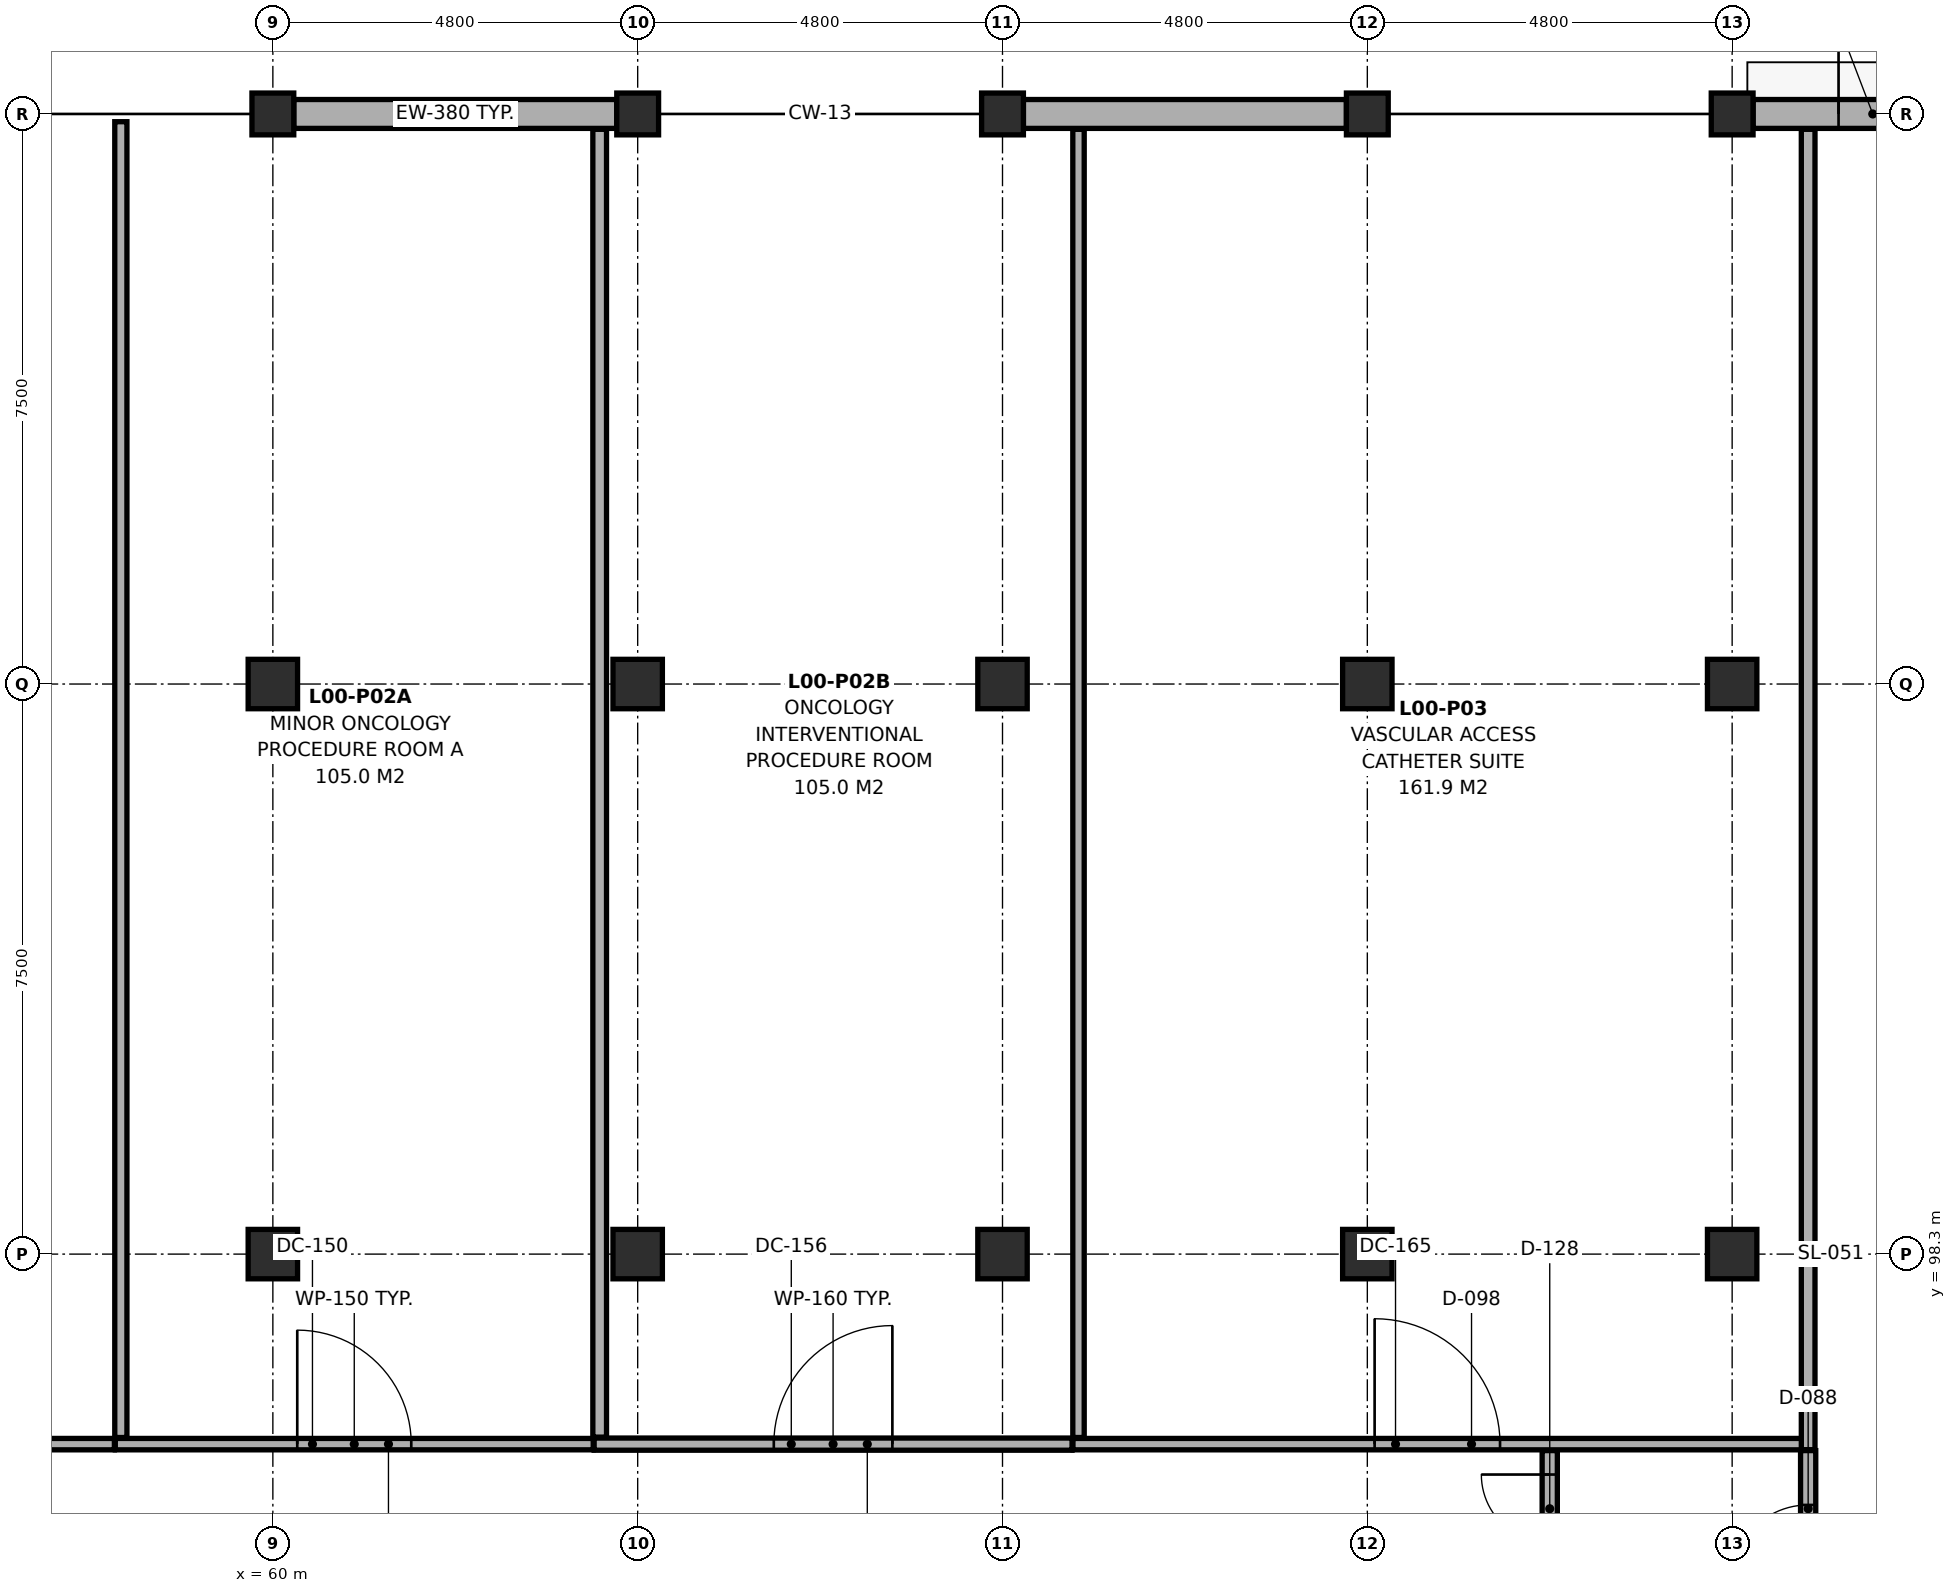
"""IFC4 building model, lengths in metres.
Left out: names, types, materials, properties, quantities, classifications, styles, units other than length and angle.
Written with IfcOpenShell. Run it as: python <this file> out.ifc"""

import sys

from ifc_helpers import new_model, si_unit, direction, frame, frame_2d, origin, origin_2d, place, context, subcontext, project, spatial, rectangle, extrude, element, fill, save


model = new_model("IFC4")
c1 = context("Model", 3, precision=1e-05, world=origin(), true_north=direction((0.0, 1.0)))
c2 = subcontext(c1, "Body", "Model", "MODEL_VIEW")
j1 = project(units=[si_unit("LENGTHUNIT", "METRE"), si_unit("PLANEANGLEUNIT", "RADIAN")], contexts=[c1])
p1 = place(None, origin())
s1 = spatial("IfcSite", under=j1, at=p1, CompositionType="ELEMENT")
p2 = place(p1, origin())
s2 = spatial("IfcBuilding", under=s1, at=p2, CompositionType="ELEMENT")
p3 = place(p2, origin())
s3 = spatial("IfcBuildingStorey", under=s2, at=p3, CompositionType="ELEMENT", Elevation=0.0)
for number, where, z_axis, x_axis in (
    (1, (60.0, 98.3, 0.0), (0.0, 0.0, 1.0), (1.0, 0.0, 0.0)),
    (2, (60.0, 105.8, 0.0), (0.0, 0.0, 1.0), (1.0, 0.0, 0.0)),
):
    element("IfcColumn", number, at=place(p3, frame(where, z_axis=z_axis, x_axis=x_axis)), inside=s3, PredefinedType="COLUMN", context=c2, shape_type="SweptSolid", body=[
        extrude(rectangle(XDim=0.65, YDim=0.65, at=origin_2d()), origin(), (0.0, 0.0, 1.0), 4.7),
    ])
p4 = place(p3, frame((60.0, 113.3, 0.0), z_axis=(0.0, 0.0, 1.0), x_axis=(1.0, 0.0, 0.0)))
e3 = element("IfcColumn", 3, at=p4, inside=s3, PredefinedType="COLUMN", context=c2, shape_type="SweptSolid", body=[
    extrude(rectangle(XDim=0.55, YDim=0.55, at=origin_2d()), origin(), (0.0, 0.0, 1.0), 4.7),
])
for number, where, z_axis, x_axis in (
    (4, (64.8, 98.3, 0.0), (0.0, 0.0, 1.0), (1.0, 0.0, 0.0)),
    (5, (64.8, 105.8, 0.0), (0.0, 0.0, 1.0), (1.0, 0.0, 0.0)),
):
    element("IfcColumn", number, at=place(p3, frame(where, z_axis=z_axis, x_axis=x_axis)), inside=s3, PredefinedType="COLUMN", context=c2, shape_type="SweptSolid", body=[
        extrude(rectangle(XDim=0.65, YDim=0.65, at=origin_2d()), origin(), (0.0, 0.0, 1.0), 4.7),
    ])
p5 = place(p3, frame((64.8, 113.3, 0.0), z_axis=(0.0, 0.0, 1.0), x_axis=(1.0, 0.0, 0.0)))
e6 = element("IfcColumn", 6, at=p5, inside=s3, PredefinedType="COLUMN", context=c2, shape_type="SweptSolid", body=[
    extrude(rectangle(XDim=0.55, YDim=0.55, at=origin_2d()), origin(), (0.0, 0.0, 1.0), 4.7),
])
for number, where, z_axis, x_axis in (
    (7, (69.6, 98.3, 0.0), (0.0, 0.0, 1.0), (1.0, 0.0, 0.0)),
    (8, (69.6, 105.8, 0.0), (0.0, 0.0, 1.0), (1.0, 0.0, 0.0)),
):
    element("IfcColumn", number, at=place(p3, frame(where, z_axis=z_axis, x_axis=x_axis)), inside=s3, PredefinedType="COLUMN", context=c2, shape_type="SweptSolid", body=[
        extrude(rectangle(XDim=0.65, YDim=0.65, at=origin_2d()), origin(), (0.0, 0.0, 1.0), 4.7),
    ])
p6 = place(p3, frame((69.6, 113.3, 0.0), z_axis=(0.0, 0.0, 1.0), x_axis=(1.0, 0.0, 0.0)))
e9 = element("IfcColumn", 9, at=p6, inside=s3, PredefinedType="COLUMN", context=c2, shape_type="SweptSolid", body=[
    extrude(rectangle(XDim=0.55, YDim=0.55, at=origin_2d()), origin(), (0.0, 0.0, 1.0), 4.7),
])
for number, where, z_axis, x_axis in (
    (10, (74.4, 98.3, 0.0), (0.0, 0.0, 1.0), (1.0, 0.0, 0.0)),
    (11, (74.4, 105.8, 0.0), (0.0, 0.0, 1.0), (1.0, 0.0, 0.0)),
):
    element("IfcColumn", number, at=place(p3, frame(where, z_axis=z_axis, x_axis=x_axis)), inside=s3, PredefinedType="COLUMN", context=c2, shape_type="SweptSolid", body=[
        extrude(rectangle(XDim=0.65, YDim=0.65, at=origin_2d()), origin(), (0.0, 0.0, 1.0), 4.7),
    ])
p7 = place(p3, frame((74.4, 113.3, 0.0), z_axis=(0.0, 0.0, 1.0), x_axis=(1.0, 0.0, 0.0)))
e12 = element("IfcColumn", 12, at=p7, inside=s3, PredefinedType="COLUMN", context=c2, shape_type="SweptSolid", body=[
    extrude(rectangle(XDim=0.55, YDim=0.55, at=origin_2d()), origin(), (0.0, 0.0, 1.0), 4.7),
])
for number, where, z_axis, x_axis in (
    (13, (79.2, 98.3, 0.0), (0.0, 0.0, 1.0), (1.0, 0.0, 0.0)),
    (14, (79.2, 105.8, 0.0), (0.0, 0.0, 1.0), (1.0, 0.0, 0.0)),
):
    element("IfcColumn", number, at=place(p3, frame(where, z_axis=z_axis, x_axis=x_axis)), inside=s3, PredefinedType="COLUMN", context=c2, shape_type="SweptSolid", body=[
        extrude(rectangle(XDim=0.65, YDim=0.65, at=origin_2d()), origin(), (0.0, 0.0, 1.0), 4.7),
    ])
p8 = place(p3, frame((79.2, 113.3, 0.0), z_axis=(0.0, 0.0, 1.0), x_axis=(1.0, 0.0, 0.0)))
e15 = element("IfcColumn", 15, at=p8, inside=s3, PredefinedType="COLUMN", context=c2, shape_type="SweptSolid", body=[
    extrude(rectangle(XDim=0.55, YDim=0.55, at=origin_2d()), origin(), (0.0, 0.0, 1.0), 4.7),
])
for number, where, z_axis, x_axis in (
    (16, (60.275, 113.3, 0.0), (0.0, 0.0, 1.0), (1.0, 0.0, 0.0)),
    (17, (69.875, 113.3, 0.0), (0.0, 0.0, 1.0), (1.0, 0.0, 0.0)),
):
    element("IfcWall", number, at=place(p3, frame(where, z_axis=z_axis, x_axis=x_axis)), inside=s3, PredefinedType="SOLIDWALL", context=c2, shape_type="SweptSolid", body=[
        extrude(rectangle(XDim=4.25, YDim=0.38, at=frame_2d((2.125, 0.0))), origin(), (0.0, 0.0, 1.0), 3.985),
    ])
p9 = place(p3, frame((79.475, 113.3, 0.0), z_axis=(0.0, 0.0, 1.0), x_axis=(1.0, 0.0, 0.0)))
e18 = element("IfcWall", 18, at=p9, inside=s3, PredefinedType="SOLIDWALL", context=c2, shape_type="SweptSolid", body=[
    extrude(rectangle(XDim=4.25, YDim=0.38, at=frame_2d((2.125, 0.0))), origin(), (0.0, 0.0, 1.0), 3.985),
])
p10 = place(p9, frame((1.125, 0.0, 0.0)))
e19 = element("IfcOpeningElement", 19, at=p10, cuts=e18, PredefinedType="OPENING", context=c2, shape_type="SweptSolid", body=[
    extrude(rectangle(XDim=2.0, YDim=2.35, at=frame_2d((1.0, 1.175))), frame((0.0, 0.202, 0.0), z_axis=(0.0, -1.0, 0.0), x_axis=(1.0, 0.0, 0.0)), (0.0, 0.0, 1.0), 0.404),
])
p11 = place(p3, frame((76.8, 93.285, 0.0), z_axis=(0.0, 0.0, 1.0), x_axis=(0.0, 1.0, 0.0)))
e20 = element("IfcWall", 20, at=p11, inside=s3, PredefinedType="PARTITIONING", context=c2, shape_type="SweptSolid", body=[
    extrude(rectangle(XDim=2.43, YDim=0.2, at=frame_2d((1.215, 0.0))), origin(), (0.0, 0.0, 1.0), 4.7),
])
p12 = place(p11, frame((0.315, 0.0, 0.0)))
e21 = element("IfcOpeningElement", 21, at=p12, cuts=e20, PredefinedType="OPENING", context=c2, shape_type="SweptSolid", body=[
    extrude(rectangle(XDim=1.8, YDim=2.15, at=frame_2d((0.9, 1.075))), frame((0.0, 0.112, 0.0), z_axis=(0.0, -1.0, 0.0), x_axis=(1.0, 0.0, 0.0)), (0.0, 0.0, 1.0), 0.224),
])
p13 = place(p3, frame((45.127, 95.8, 0.0), z_axis=(0.0, 0.0, 1.0), x_axis=(1.0, 0.0, 0.0)))
e22 = element("IfcWall", 22, at=p13, inside=s3, PredefinedType="PARTITIONING", context=c2, shape_type="SweptSolid", body=[
    extrude(rectangle(XDim=12.788, YDim=0.15, at=frame_2d((6.394, 0.0))), origin(), (0.0, 0.0, 1.0), 3.985),
])
p14 = place(p13, frame((5.669, 0.0, 0.0)))
e23 = element("IfcOpeningElement", 23, at=p14, cuts=e22, PredefinedType="OPENING", context=c2, shape_type="SweptSolid", body=[
    extrude(rectangle(XDim=1.45, YDim=2.26, at=frame_2d((0.725, 1.13))), frame((0.0, 0.087, 0.0), z_axis=(0.0, -1.0, 0.0), x_axis=(1.0, 0.0, 0.0)), (0.0, 0.0, 1.0), 0.174),
])
p15 = place(p3, frame((57.927, 95.8, 0.0), z_axis=(0.0, 0.0, 1.0), x_axis=(1.0, 0.0, 0.0)))
e24 = element("IfcWall", 24, at=p15, inside=s3, PredefinedType="PARTITIONING", context=c2, shape_type="SweptSolid", body=[
    extrude(rectangle(XDim=6.288, YDim=0.15, at=frame_2d((3.144, 0.0))), origin(), (0.0, 0.0, 1.0), 3.985),
])
p16 = place(p15, frame((2.394, 0.0, 0.0)))
e25 = element("IfcOpeningElement", 25, at=p16, cuts=e24, PredefinedType="OPENING", context=c2, shape_type="SweptSolid", body=[
    extrude(rectangle(XDim=1.5, YDim=2.28, at=frame_2d((0.75, 1.14))), frame((0.0, 0.087, 0.0), z_axis=(0.0, -1.0, 0.0), x_axis=(1.0, 0.0, 0.0)), (0.0, 0.0, 1.0), 0.174),
])
p17 = place(p3, frame((64.227, 95.8, 0.0), z_axis=(0.0, 0.0, 1.0), x_axis=(1.0, 0.0, 0.0)))
e26 = element("IfcWall", 26, at=p17, inside=s3, PredefinedType="PARTITIONING", context=c2, shape_type="SweptSolid", body=[
    extrude(rectangle(XDim=6.288, YDim=0.16, at=frame_2d((3.144, 0.0))), origin(), (0.0, 0.0, 1.0), 3.985),
])
p18 = place(p17, frame((2.364, 0.0, 0.0)))
e27 = element("IfcOpeningElement", 27, at=p18, cuts=e26, PredefinedType="OPENING", context=c2, shape_type="SweptSolid", body=[
    extrude(rectangle(XDim=1.56, YDim=2.3, at=frame_2d((0.78, 1.15))), frame((0.0, 0.092, 0.0), z_axis=(0.0, -1.0, 0.0), x_axis=(1.0, 0.0, 0.0)), (0.0, 0.0, 1.0), 0.184),
])
p19 = place(p3, frame((70.527, 95.8, 0.0), z_axis=(0.0, 0.0, 1.0), x_axis=(1.0, 0.0, 0.0)))
e28 = element("IfcWall", 28, at=p19, inside=s3, PredefinedType="PARTITIONING", context=c2, shape_type="SweptSolid", body=[
    extrude(rectangle(XDim=9.588, YDim=0.15, at=frame_2d((4.794, 0.0))), origin(), (0.0, 0.0, 1.0), 3.985),
])
p20 = place(p19, frame((3.969, 0.0, 0.0)))
e29 = element("IfcOpeningElement", 29, at=p20, cuts=e28, PredefinedType="OPENING", context=c2, shape_type="SweptSolid", body=[
    extrude(rectangle(XDim=1.65, YDim=2.32, at=frame_2d((0.825, 1.16))), frame((0.0, 0.087, 0.0), z_axis=(0.0, -1.0, 0.0), x_axis=(1.0, 0.0, 0.0)), (0.0, 0.0, 1.0), 0.174),
])
p21 = place(p3, frame((80.2, 93.285, 0.0), z_axis=(0.0, 0.0, 1.0), x_axis=(0.0, 1.0, 0.0)))
e30 = element("IfcWall", 30, at=p21, inside=s3, PredefinedType="PARTITIONING", context=c2, shape_type="SweptSolid", body=[
    extrude(rectangle(XDim=2.43, YDim=0.2, at=frame_2d((1.215, 0.0))), origin(), (0.0, 0.0, 1.0), 4.7),
])
p22 = place(p21, frame((0.715, 0.0, 0.0)))
e31 = element("IfcOpeningElement", 31, at=p22, cuts=e30, PredefinedType="OPENING", context=c2, shape_type="SweptSolid", body=[
    extrude(rectangle(XDim=1.0, YDim=2.15, at=frame_2d((0.5, 1.075))), frame((0.0, 0.112, 0.0), z_axis=(0.0, -1.0, 0.0), x_axis=(1.0, 0.0, 0.0)), (0.0, 0.0, 1.0), 0.224),
])
p23 = place(p3, frame((58.0, 95.887, 0.0), z_axis=(0.0, 0.0, 1.0), x_axis=(0.0, 1.0, 0.0)))
e32 = element("IfcWall", 32, at=p23, inside=s3, PredefinedType="PARTITIONING", context=c2, shape_type="SweptSolid", body=[
    extrude(rectangle(XDim=17.311, YDim=0.16, at=frame_2d((8.656, 0.0))), origin(), (0.0, 0.0, 1.0), 3.985),
])
p24 = place(p3, frame((64.3, 95.892, 0.0), z_axis=(0.0, 0.0, 1.0), x_axis=(0.0, 1.0, 0.0)))
e33 = element("IfcWall", 33, at=p24, inside=s3, PredefinedType="PARTITIONING", context=c2, shape_type="SweptSolid", body=[
    extrude(rectangle(XDim=17.206, YDim=0.18, at=frame_2d((8.603, 0.0))), origin(), (0.0, 0.0, 1.0), 4.035),
])
p25 = place(p3, frame((70.6, 95.887, 0.0), z_axis=(0.0, 0.0, 1.0), x_axis=(0.0, 1.0, 0.0)))
e34 = element("IfcWall", 34, at=p25, inside=s3, PredefinedType="PARTITIONING", context=c2, shape_type="SweptSolid", body=[
    extrude(rectangle(XDim=17.211, YDim=0.15, at=frame_2d((8.605, 0.0))), origin(), (0.0, 0.0, 1.0), 4.035),
])
p26 = place(p3, frame((80.2, 95.727, 0.0), z_axis=(0.0, 0.0, 1.0), x_axis=(0.0, 1.0, 0.0)))
e35 = element("IfcWall", 35, at=p26, inside=s3, PredefinedType="PARTITIONING", context=c2, shape_type="SweptSolid", body=[
    extrude(rectangle(XDim=17.371, YDim=0.18, at=frame_2d((8.686, 0.0))), origin(), (0.0, 0.0, 1.0), 4.035),
])
p27 = place(p10, origin())
e36 = element("IfcDoor", 36, at=p27, inside=s3, OperationType="DOUBLE_DOOR_SINGLE_SWING", PredefinedType="DOOR", context=c2, shape_type="SweptSolid", body=[
    extrude(rectangle(XDim=2.0, YDim=2.35, at=frame_2d((1.0, 1.175))), frame((0.0, 0.025, 0.0), z_axis=(0.0, -1.0, 0.0), x_axis=(1.0, 0.0, 0.0)), (0.0, 0.0, 1.0), 0.05),
])
fill(e19, e36)
p28 = place(p12, origin())
e37 = element("IfcDoor", 37, at=p28, inside=s3, OperationType="DOUBLE_DOOR_SINGLE_SWING", PredefinedType="DOOR", context=c2, shape_type="SweptSolid", body=[
    extrude(rectangle(XDim=1.8, YDim=2.15, at=frame_2d((0.9, 1.075))), frame((0.0, 0.025, 0.0), z_axis=(0.0, -1.0, 0.0), x_axis=(1.0, 0.0, 0.0)), (0.0, 0.0, 1.0), 0.05),
])
fill(e21, e37)
p29 = place(p16, origin())
e38 = element("IfcDoor", 38, at=p29, inside=s3, OperationType="SINGLE_SWING_LEFT", PredefinedType="DOOR", context=c2, shape_type="SweptSolid", body=[
    extrude(rectangle(XDim=1.5, YDim=2.28, at=frame_2d((0.75, 1.14))), frame((0.0, 0.025, 0.0), z_axis=(0.0, -1.0, 0.0), x_axis=(1.0, 0.0, 0.0)), (0.0, 0.0, 1.0), 0.05),
])
fill(e25, e38)
p30 = place(p18, origin())
e39 = element("IfcDoor", 39, at=p30, inside=s3, OperationType="SINGLE_SWING_RIGHT", PredefinedType="DOOR", context=c2, shape_type="SweptSolid", body=[
    extrude(rectangle(XDim=1.56, YDim=2.3, at=frame_2d((0.78, 1.15))), frame((0.0, 0.025, 0.0), z_axis=(0.0, -1.0, 0.0), x_axis=(1.0, 0.0, 0.0)), (0.0, 0.0, 1.0), 0.05),
])
fill(e27, e39)
p31 = place(p20, origin())
e40 = element("IfcDoor", 40, at=p31, inside=s3, OperationType="SINGLE_SWING_LEFT", PredefinedType="DOOR", context=c2, shape_type="SweptSolid", body=[
    extrude(rectangle(XDim=1.65, YDim=2.32, at=frame_2d((0.825, 1.16))), frame((0.0, 0.025, 0.0), z_axis=(0.0, -1.0, 0.0), x_axis=(1.0, 0.0, 0.0)), (0.0, 0.0, 1.0), 0.05),
])
fill(e29, e40)
p32 = place(p22, origin())
e41 = element("IfcDoor", 41, at=p32, inside=s3, OperationType="SINGLE_SWING_LEFT", PredefinedType="DOOR", context=c2, shape_type="SweptSolid", body=[
    extrude(rectangle(XDim=1.0, YDim=2.15, at=frame_2d((0.5, 1.075))), frame((0.0, 0.025, 0.0), z_axis=(0.0, -1.0, 0.0), x_axis=(1.0, 0.0, 0.0)), (0.0, 0.0, 1.0), 0.05),
])
fill(e31, e41)
save(model, sys.argv[1])
